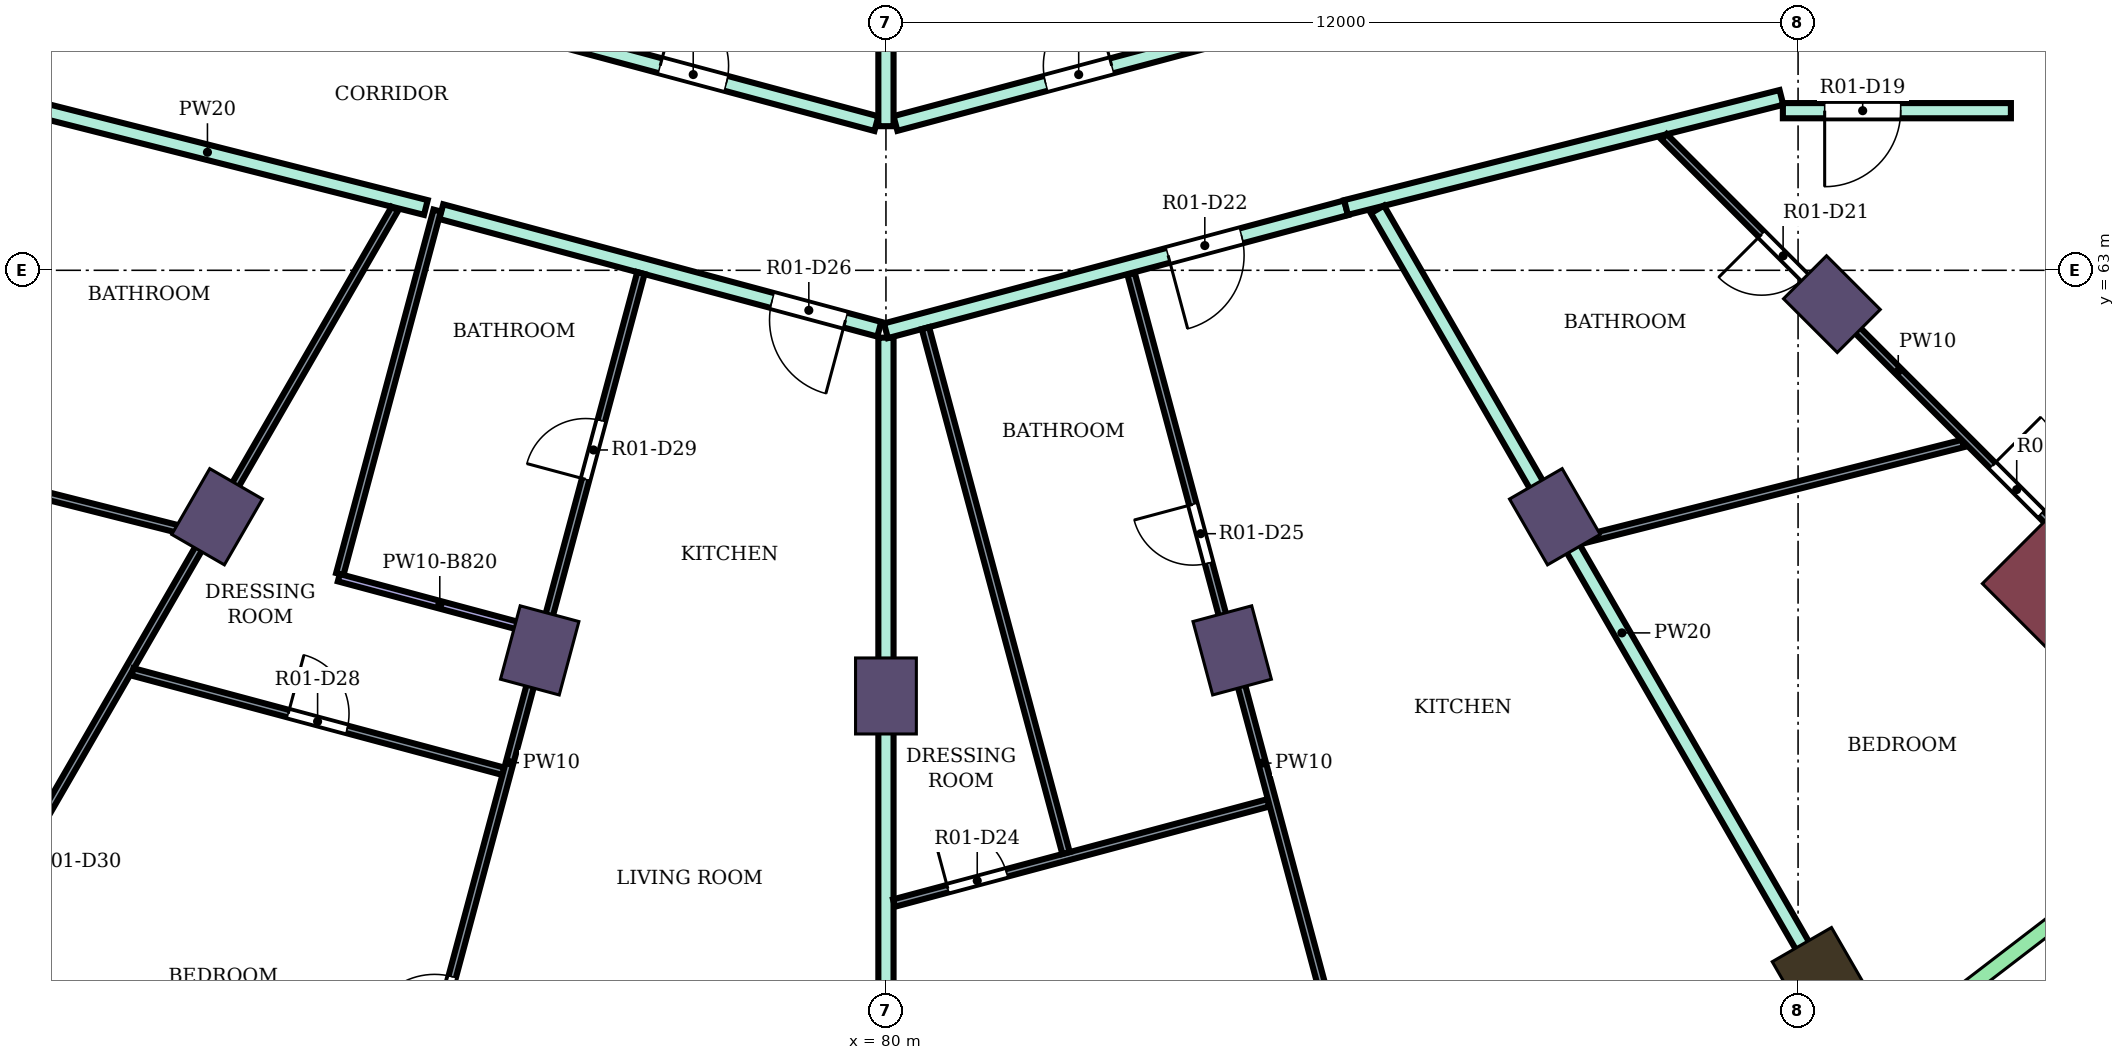
"""IFC4 building model, lengths in metres.
Left out: names, types, materials, properties, quantities, classifications, styles, units other than length and angle.
Written with IfcOpenShell. Run it as: python <this file> out.ifc"""

import sys

from ifc_helpers import new_model, si_unit, direction, frame, frame_2d, origin, origin_2d, place, context, subcontext, project, spatial, rectangle, extrude, element, fill, save


model = new_model("IFC4")
c1 = context("Model", 3, precision=1e-05, world=origin(), true_north=direction((0.0, 1.0)))
c2 = subcontext(c1, "Body", "Model", "MODEL_VIEW")
j1 = project(units=[si_unit("LENGTHUNIT", "METRE"), si_unit("PLANEANGLEUNIT", "RADIAN")], contexts=[c1])
p1 = place(None, origin())
s1 = spatial("IfcSite", under=j1, at=p1, CompositionType="ELEMENT")
p2 = place(p1, origin())
s2 = spatial("IfcBuilding", under=s1, at=p2, CompositionType="ELEMENT")
p3 = place(p2, frame((0.0, 0.0, 157.7)))
s3 = spatial("IfcBuildingStorey", under=s2, at=p3, CompositionType="ELEMENT", Elevation=157.7)
p4 = place(p3, frame((92.3, 53.696, 0.0), z_axis=(0.0, 0.0, 1.0), x_axis=(0.5, -0.866025403784, 0.0)))
e1 = element("IfcColumn", 1, at=p4, inside=s3, PredefinedType="COLUMN", context=c2, shape_type="SweptSolid", body=[
    extrude(rectangle(XDim=1.0, YDim=0.9, at=origin_2d()), origin(), (0.0, 0.0, 1.0), 4.1),
])
for number, where, z_axis, x_axis in (
    (2, (71.2, 59.758, 0.0), (0.0, 0.0, 1.0), (-0.5, -0.866, 0.0)),
    (3, (75.445, 58.0, 0.0), (0.0, 0.0, 1.0), (-0.259, -0.966, 0.0)),
    (4, (80.0, 57.4, 0.0), (0.0, 0.0, 1.0), (0.0, -1.0, 0.0)),
    (5, (84.555, 58.0, 0.0), (0.0, 0.0, 1.0), (0.259, -0.966, 0.0)),
    (6, (88.8, 59.758, 0.0), (0.0, 0.0, 1.0), (0.5, -0.866, 0.0)),
    (7, (92.445, 62.555, 0.0), (0.0, 0.0, 1.0), (0.707, -0.707, 0.0)),
):
    element("IfcColumn", number, at=place(p3, frame(where, z_axis=z_axis, x_axis=x_axis)), inside=s3, PredefinedType="COLUMN", context=c2, shape_type="SweptSolid", body=[
        extrude(rectangle(XDim=1.0, YDim=0.8, at=origin_2d()), origin(), (0.0, 0.0, 1.0), 4.1),
    ])
p5 = place(p3, frame((95.91, 59.09, 0.0), z_axis=(0.0, 0.0, 1.0), x_axis=(0.707106781187, -0.707106781187, 0.0)))
e8 = element("IfcColumn", 8, at=p5, inside=s3, PredefinedType="COLUMN", context=c2, shape_type="SweptSolid", body=[
    extrude(rectangle(XDim=1.8, YDim=2.4, at=origin_2d()), origin(), (0.0, 0.0, 1.0), 4.1),
])
p6 = place(p3, frame((68.2, 65.28, 0.0), z_axis=(0.0, 0.0, 1.0), x_axis=(0.969450596516, -0.245286650503, 0.0)))
e9 = element("IfcWall", 9, at=p6, inside=s3, PredefinedType="PARTITIONING", context=c2, shape_type="SweptSolid", body=[
    extrude(rectangle(XDim=5.928, YDim=0.2, at=frame_2d((2.964, 0.0))), origin(), (0.0, 0.0, 1.0), 3.65),
])
p7 = place(p3, frame((74.15, 63.772, 0.0), z_axis=(0.0, 0.0, 1.0), x_axis=(0.965807109237, -0.259261697417, 0.0)))
e10 = element("IfcWall", 10, at=p7, inside=s3, PredefinedType="PARTITIONING", context=c2, shape_type="SweptSolid", body=[
    extrude(rectangle(XDim=5.967, YDim=0.2, at=frame_2d((2.983, 0.0))), origin(), (0.0, 0.0, 1.0), 3.65),
])
p8 = place(p7, frame((4.507, 0.0, 0.0)))
e11 = element("IfcOpeningElement", 11, at=p8, cuts=e10, PredefinedType="OPENING", context=c2, shape_type="SweptSolid", body=[
    extrude(rectangle(XDim=1.0, YDim=2.1, at=frame_2d((0.5, 1.05))), frame((0.0, 0.11, 0.0), z_axis=(0.0, -1.0, 0.0), x_axis=(1.0, 0.0, 0.0)), (0.0, 0.0, 1.0), 0.22),
])
p9 = place(p3, frame((74.603, 66.342, 0.0), z_axis=(0.0, 0.0, 1.0), x_axis=(0.965920893652, -0.258837453254, 0.0)))
e12 = element("IfcWall", 12, at=p9, inside=s3, PredefinedType="PARTITIONING", context=c2, shape_type="SweptSolid", body=[
    extrude(rectangle(XDim=5.458, YDim=0.2, at=frame_2d((2.729, 0.0))), origin(), (0.0, 0.0, 1.0), 3.65),
])
p10 = place(p9, frame((2.512, 0.0, 0.0)))
e13 = element("IfcOpeningElement", 13, at=p10, cuts=e12, PredefinedType="OPENING", context=c2, shape_type="SweptSolid", body=[
    extrude(rectangle(XDim=0.9, YDim=2.1, at=frame_2d((0.45, 1.05))), frame((0.0, 0.11, 0.0), z_axis=(0.0, -1.0, 0.0), x_axis=(1.0, 0.0, 0.0)), (0.0, 0.0, 1.0), 0.22),
])
p11 = place(p3, frame((80.125, 64.932, 0.0), z_axis=(0.0, 0.0, 1.0), x_axis=(0.966236955806, 0.257655089674, 0.0)))
e14 = element("IfcWall", 14, at=p11, inside=s3, PredefinedType="PARTITIONING", context=c2, shape_type="SweptSolid", body=[
    extrude(rectangle(XDim=8.039, YDim=0.2, at=frame_2d((4.02, 0.0))), origin(), (0.0, 0.0, 1.0), 3.65),
])
p12 = place(p11, frame((6.298, 0.0, 0.0)))
e15 = element("IfcOpeningElement", 15, at=p12, cuts=e14, PredefinedType="OPENING", context=c2, shape_type="SweptSolid", body=[
    extrude(rectangle(XDim=0.9, YDim=2.1, at=frame_2d((0.45, 1.05))), frame((0.0, 0.11, 0.0), z_axis=(0.0, -1.0, 0.0), x_axis=(1.0, 0.0, 0.0)), (0.0, 0.0, 1.0), 0.22),
])
p13 = place(p11, frame((2.045, 0.0, 0.0)))
e16 = element("IfcOpeningElement", 16, at=p13, cuts=e14, PredefinedType="OPENING", context=c2, shape_type="SweptSolid", body=[
    extrude(rectangle(XDim=0.9, YDim=2.1, at=frame_2d((0.45, 1.05))), frame((0.0, 0.11, 0.0), z_axis=(0.0, -1.0, 0.0), x_axis=(1.0, 0.0, 0.0)), (0.0, 0.0, 1.0), 0.22),
])
p14 = place(p3, frame((80.0, 51.8, 0.0), z_axis=(0.0, 0.0, 1.0), x_axis=(0.0, 1.0, 0.0)))
e17 = element("IfcWall", 17, at=p14, inside=s3, PredefinedType="PARTITIONING", context=c2, shape_type="SweptSolid", body=[
    extrude(rectangle(XDim=10.314, YDim=0.2, at=frame_2d((5.157, 0.0))), origin(), (0.0, 0.0, 1.0), 3.65),
])
p15 = place(p3, frame((80.0, 62.205, 0.0), z_axis=(0.0, 0.0, 1.0), x_axis=(0.966104192593, 0.258152453124, 0.0)))
e18 = element("IfcWall", 18, at=p15, inside=s3, PredefinedType="PARTITIONING", context=c2, shape_type="SweptSolid", body=[
    extrude(rectangle(XDim=6.266, YDim=0.2, at=frame_2d((3.133, 0.0))), origin(), (0.0, 0.0, 1.0), 3.65),
])
p16 = place(p15, frame((3.842, 0.0, 0.0)))
e19 = element("IfcOpeningElement", 19, at=p16, cuts=e18, PredefinedType="OPENING", context=c2, shape_type="SweptSolid", body=[
    extrude(rectangle(XDim=1.0, YDim=2.1, at=frame_2d((0.5, 1.05))), frame((0.0, 0.11, 0.0), z_axis=(0.0, -1.0, 0.0), x_axis=(1.0, 0.0, 0.0)), (0.0, 0.0, 1.0), 0.22),
])
p17 = place(p3, frame((80.0, 64.896, 0.0), z_axis=(0.0, 0.0, 1.0), x_axis=(0.0, 1.0, 0.0)))
e20 = element("IfcWall", 20, at=p17, inside=s3, PredefinedType="PARTITIONING", context=c2, shape_type="SweptSolid", body=[
    extrude(rectangle(XDim=2.405, YDim=0.2, at=frame_2d((1.203, 0.0))), origin(), (0.0, 0.0, 1.0), 3.65),
])
p18 = place(p3, frame((86.053, 63.826, 0.0), z_axis=(0.0, 0.0, 1.0), x_axis=(0.969490004987, 0.245130843083, 0.0)))
e21 = element("IfcWall", 21, at=p18, inside=s3, PredefinedType="PARTITIONING", context=c2, shape_type="SweptSolid", body=[
    extrude(rectangle(XDim=5.908, YDim=0.2, at=frame_2d((2.954, 0.0))), origin(), (0.0, 0.0, 1.0), 3.65),
])
p19 = place(p3, frame((86.466, 63.801, 0.0), z_axis=(0.0, 0.0, 1.0), x_axis=(0.499951314491, -0.866053510551, 0.0)))
e22 = element("IfcWall", 22, at=p19, inside=s3, PredefinedType="PARTITIONING", context=c2, shape_type="SweptSolid", body=[
    extrude(rectangle(XDim=12.866, YDim=0.2, at=frame_2d((6.433, 0.0))), origin(), (0.0, 0.0, 1.0), 3.65),
])
p20 = place(p3, frame((91.8, 65.1, 0.0), z_axis=(0.0, 0.0, 1.0), x_axis=(1.0, 0.0, 0.0)))
e23 = element("IfcWall", 23, at=p20, inside=s3, PredefinedType="PARTITIONING", context=c2, shape_type="SweptSolid", body=[
    extrude(rectangle(XDim=3.0, YDim=0.2, at=frame_2d((1.5, 0.0))), origin(), (0.0, 0.0, 1.0), 3.65),
])
p21 = place(p20, frame((0.55, 0.0, 0.0)))
e24 = element("IfcOpeningElement", 24, at=p21, cuts=e23, PredefinedType="OPENING", context=c2, shape_type="SweptSolid", body=[
    extrude(rectangle(XDim=1.0, YDim=2.1, at=frame_2d((0.5, 1.05))), frame((0.0, 0.11, 0.0), z_axis=(0.0, -1.0, 0.0), x_axis=(1.0, 0.0, 0.0)), (0.0, 0.0, 1.0), 0.22),
])
p22 = place(p3, frame((65.904, 60.806, 0.0), z_axis=(0.0, 0.0, 1.0), x_axis=(0.969477107154, -0.245181848237, 0.0)))
e25 = element("IfcWall", 25, at=p22, inside=s3, PredefinedType="PARTITIONING", context=c2, shape_type="SweptSolid", body=[
    extrude(rectangle(XDim=5.252, YDim=0.1, at=frame_2d((2.626, 0.0))), origin(), (0.0, 0.0, 1.0), 3.65),
])
p23 = place(p22, frame((2.216, 0.0, 0.0)))
e26 = element("IfcOpeningElement", 26, at=p23, cuts=e25, PredefinedType="OPENING", context=c2, shape_type="SweptSolid", body=[
    extrude(rectangle(XDim=0.8, YDim=2.1, at=frame_2d((0.4, 1.05))), frame((0.0, 0.06, 0.0), z_axis=(0.0, -1.0, 0.0), x_axis=(1.0, 0.0, 0.0)), (0.0, 0.0, 1.0), 0.12),
])
p24 = place(p3, frame((67.101, 52.659, 0.0), z_axis=(0.0, 0.0, 1.0), x_axis=(0.499985055897, 0.866034031594, 0.0)))
e27 = element("IfcWall", 27, at=p24, inside=s3, PredefinedType="PARTITIONING", context=c2, shape_type="SweptSolid", body=[
    extrude(rectangle(XDim=12.876, YDim=0.1, at=frame_2d((6.438, 0.0))), origin(), (0.0, 0.0, 1.0), 3.65),
])
p25 = place(p24, frame((2.504, 0.0, 0.0)))
e28 = element("IfcOpeningElement", 28, at=p25, cuts=e27, PredefinedType="OPENING", context=c2, shape_type="SweptSolid", body=[
    extrude(rectangle(XDim=0.9, YDim=2.1, at=frame_2d((0.45, 1.05))), frame((0.0, 0.06, 0.0), z_axis=(0.0, -1.0, 0.0), x_axis=(1.0, 0.0, 0.0)), (0.0, 0.0, 1.0), 0.12),
])
p26 = place(p3, frame((70.088, 57.717, 0.0), z_axis=(0.0, 0.0, 1.0), x_axis=(0.965906836082, -0.258889907124, 0.0)))
e29 = element("IfcWall", 29, at=p26, inside=s3, PredefinedType="PARTITIONING", context=c2, shape_type="SweptSolid", body=[
    extrude(rectangle(XDim=5.051, YDim=0.1, at=frame_2d((2.525, 0.0))), origin(), (0.0, 0.0, 1.0), 3.65),
])
p27 = place(p26, frame((2.121, 0.0, 0.0)))
e30 = element("IfcOpeningElement", 30, at=p27, cuts=e29, PredefinedType="OPENING", context=c2, shape_type="SweptSolid", body=[
    extrude(rectangle(XDim=0.8, YDim=2.1, at=frame_2d((0.4, 1.05))), frame((0.0, 0.06, 0.0), z_axis=(0.0, -1.0, 0.0), x_axis=(1.0, 0.0, 0.0)), (0.0, 0.0, 1.0), 0.12),
])
p28 = place(p3, frame((72.815, 59.004, 0.0), z_axis=(0.0, 0.0, 1.0), x_axis=(0.25878292514, 0.96593550388, 0.0)))
e31 = element("IfcWall", 31, at=p28, inside=s3, PredefinedType="PARTITIONING", context=c2, shape_type="SweptSolid", body=[
    extrude(rectangle(XDim=4.95, YDim=0.1, at=frame_2d((2.475, 0.0))), origin(), (0.0, 0.0, 1.0), 3.65),
])
p29 = place(p3, frame((72.802, 58.956, 0.0), z_axis=(0.0, 0.0, 1.0), x_axis=(0.965887802097, -0.258960911647, 0.0)))
e32 = element("IfcWall", 32, at=p29, inside=s3, PredefinedType="PARTITIONING", context=c2, shape_type="SweptSolid", body=[
    extrude(rectangle(XDim=2.75, YDim=0.1, at=frame_2d((1.375, 0.0))), origin(), (0.0, 0.0, 1.0), 3.28),
])
p30 = place(p3, frame((73.322, 50.081, 0.0), z_axis=(0.0, 0.0, 1.0), x_axis=(0.258982801816, 0.965881932931, 0.0)))
e33 = element("IfcWall", 33, at=p30, inside=s3, PredefinedType="PARTITIONING", context=c2, shape_type="SweptSolid", body=[
    extrude(rectangle(XDim=13.338, YDim=0.1, at=frame_2d((6.669, 0.0))), origin(), (0.0, 0.0, 1.0), 3.65),
])
p31 = place(p30, frame((2.854, 0.0, 0.0)))
e34 = element("IfcOpeningElement", 34, at=p31, cuts=e33, PredefinedType="OPENING", context=c2, shape_type="SweptSolid", body=[
    extrude(rectangle(XDim=0.9, YDim=2.1, at=frame_2d((0.45, 1.05))), frame((0.0, 0.06, 0.0), z_axis=(0.0, -1.0, 0.0), x_axis=(1.0, 0.0, 0.0)), (0.0, 0.0, 1.0), 0.12),
])
p32 = place(p30, frame((10.528, 0.0, 0.0)))
e35 = element("IfcOpeningElement", 35, at=p32, cuts=e33, PredefinedType="OPENING", context=c2, shape_type="SweptSolid", body=[
    extrude(rectangle(XDim=0.8, YDim=2.1, at=frame_2d((0.4, 1.05))), frame((0.0, 0.06, 0.0), z_axis=(0.0, -1.0, 0.0), x_axis=(1.0, 0.0, 0.0)), (0.0, 0.0, 1.0), 0.12),
])
p33 = place(p3, frame((80.106, 54.676, 0.0), z_axis=(0.0, 0.0, 1.0), x_axis=(0.965976901679, 0.258628353863, 0.0)))
e36 = element("IfcWall", 36, at=p33, inside=s3, PredefinedType="PARTITIONING", context=c2, shape_type="SweptSolid", body=[
    extrude(rectangle(XDim=5.097, YDim=0.1, at=frame_2d((2.549, 0.0))), origin(), (0.0, 0.0, 1.0), 3.65),
])
p34 = place(p33, frame((0.733, 0.0, 0.0)))
e37 = element("IfcOpeningElement", 37, at=p34, cuts=e36, PredefinedType="OPENING", context=c2, shape_type="SweptSolid", body=[
    extrude(rectangle(XDim=0.8, YDim=2.1, at=frame_2d((0.4, 1.05))), frame((0.0, 0.06, 0.0), z_axis=(0.0, -1.0, 0.0), x_axis=(1.0, 0.0, 0.0)), (0.0, 0.0, 1.0), 0.12),
])
p35 = place(p3, frame((80.519, 62.239, 0.0), z_axis=(0.0, 0.0, 1.0), x_axis=(0.25878046533, -0.965936162882, 0.0)))
e38 = element("IfcWall", 38, at=p35, inside=s3, PredefinedType="PARTITIONING", context=c2, shape_type="SweptSolid", body=[
    extrude(rectangle(XDim=7.149, YDim=0.1, at=frame_2d((3.575, 0.0))), origin(), (0.0, 0.0, 1.0), 3.65),
])
p36 = place(p3, frame((83.225, 62.954, 0.0), z_axis=(0.0, 0.0, 1.0), x_axis=(0.258715941946, -0.965953446799, 0.0)))
e39 = element("IfcWall", 39, at=p36, inside=s3, PredefinedType="PARTITIONING", context=c2, shape_type="SweptSolid", body=[
    extrude(rectangle(XDim=13.328, YDim=0.1, at=frame_2d((6.664, 0.0))), origin(), (0.0, 0.0, 1.0), 3.65),
])
p37 = place(p36, frame((9.784, 0.0, 0.0)))
e40 = element("IfcOpeningElement", 40, at=p37, cuts=e39, PredefinedType="OPENING", context=c2, shape_type="SweptSolid", body=[
    extrude(rectangle(XDim=0.9, YDim=2.1, at=frame_2d((0.45, 1.05))), frame((0.0, 0.06, 0.0), z_axis=(0.0, -1.0, 0.0), x_axis=(1.0, 0.0, 0.0)), (0.0, 0.0, 1.0), 0.12),
])
p38 = place(p36, frame((3.14, 0.0, 0.0)))
e41 = element("IfcOpeningElement", 41, at=p38, cuts=e39, PredefinedType="OPENING", context=c2, shape_type="SweptSolid", body=[
    extrude(rectangle(XDim=0.8, YDim=2.1, at=frame_2d((0.4, 1.05))), frame((0.0, 0.06, 0.0), z_axis=(0.0, -1.0, 0.0), x_axis=(1.0, 0.0, 0.0)), (0.0, 0.0, 1.0), 0.12),
])
p39 = place(p3, frame((89.106, 59.441, 0.0), z_axis=(0.0, 0.0, 1.0), x_axis=(0.969462385749, 0.245240051009, 0.0)))
e42 = element("IfcWall", 42, at=p39, inside=s3, PredefinedType="PARTITIONING", context=c2, shape_type="SweptSolid", body=[
    extrude(rectangle(XDim=5.223, YDim=0.1, at=frame_2d((2.612, 0.0))), origin(), (0.0, 0.0, 1.0), 3.65),
])
p40 = place(p3, frame((90.236, 64.758, 0.0), z_axis=(0.0, 0.0, 1.0), x_axis=(0.706938769128, -0.707274753334, 0.0)))
e43 = element("IfcWall", 43, at=p40, inside=s3, PredefinedType="PARTITIONING", context=c2, shape_type="SweptSolid", body=[
    extrude(rectangle(XDim=8.72, YDim=0.1, at=frame_2d((4.36, 0.0))), origin(), (0.0, 0.0, 1.0), 3.65),
])
p41 = place(p40, frame((6.115, 0.0, 0.0)))
e44 = element("IfcOpeningElement", 44, at=p41, cuts=e43, PredefinedType="OPENING", context=c2, shape_type="SweptSolid", body=[
    extrude(rectangle(XDim=0.9, YDim=2.1, at=frame_2d((0.45, 1.05))), frame((0.0, 0.06, 0.0), z_axis=(0.0, -1.0, 0.0), x_axis=(1.0, 0.0, 0.0)), (0.0, 0.0, 1.0), 0.12),
])
p42 = place(p40, frame((1.817, 0.0, 0.0)))
e45 = element("IfcOpeningElement", 45, at=p42, cuts=e43, PredefinedType="OPENING", context=c2, shape_type="SweptSolid", body=[
    extrude(rectangle(XDim=0.8, YDim=2.1, at=frame_2d((0.4, 1.05))), frame((0.0, 0.06, 0.0), z_axis=(0.0, -1.0, 0.0), x_axis=(1.0, 0.0, 0.0)), (0.0, 0.0, 1.0), 0.12),
])
p43 = place(p21, frame((1.0, 0.0, 0.0), z_axis=(0.0, 0.0, 1.0), x_axis=(-1.0, 0.0, 0.0)))
e46 = element("IfcDoor", 46, at=p43, inside=s3, OperationType="SINGLE_SWING_RIGHT", PredefinedType="DOOR", context=c2, shape_type="SweptSolid", body=[
    extrude(rectangle(XDim=1.0, YDim=2.1, at=frame_2d((0.5, 1.05))), frame((0.0, 0.025, 0.0), z_axis=(0.0, -1.0, 0.0), x_axis=(1.0, 0.0, 0.0)), (0.0, 0.0, 1.0), 0.05),
])
fill(e24, e46)
p44 = place(p41, origin())
e47 = element("IfcDoor", 47, at=p44, inside=s3, OperationType="SINGLE_SWING_LEFT", PredefinedType="DOOR", context=c2, shape_type="SweptSolid", body=[
    extrude(rectangle(XDim=0.9, YDim=2.1, at=frame_2d((0.45, 1.05))), frame((0.0, 0.025, 0.0), z_axis=(0.0, -1.0, 0.0), x_axis=(1.0, 0.0, 0.0)), (0.0, 0.0, 1.0), 0.05),
])
fill(e44, e47)
p45 = place(p42, frame((0.8, 0.0, 0.0), z_axis=(0.0, 0.0, 1.0), x_axis=(-1.0, 0.0, 0.0)))
e48 = element("IfcDoor", 48, at=p45, inside=s3, OperationType="SINGLE_SWING_RIGHT", PredefinedType="DOOR", context=c2, shape_type="SweptSolid", body=[
    extrude(rectangle(XDim=0.8, YDim=2.1, at=frame_2d((0.4, 1.05))), frame((0.0, 0.025, 0.0), z_axis=(0.0, -1.0, 0.0), x_axis=(1.0, 0.0, 0.0)), (0.0, 0.0, 1.0), 0.05),
])
fill(e45, e48)
p46 = place(p16, frame((1.0, 0.0, 0.0), z_axis=(0.0, 0.0, 1.0), x_axis=(-1.0, 0.0, 0.0)))
e49 = element("IfcDoor", 49, at=p46, inside=s3, OperationType="SINGLE_SWING_RIGHT", PredefinedType="DOOR", context=c2, shape_type="SweptSolid", body=[
    extrude(rectangle(XDim=1.0, YDim=2.1, at=frame_2d((0.5, 1.05))), frame((0.0, 0.025, 0.0), z_axis=(0.0, -1.0, 0.0), x_axis=(1.0, 0.0, 0.0)), (0.0, 0.0, 1.0), 0.05),
])
fill(e19, e49)
p47 = place(p34, origin())
e50 = element("IfcDoor", 50, at=p47, inside=s3, OperationType="SINGLE_SWING_LEFT", PredefinedType="DOOR", context=c2, shape_type="SweptSolid", body=[
    extrude(rectangle(XDim=0.8, YDim=2.1, at=frame_2d((0.4, 1.05))), frame((0.0, 0.025, 0.0), z_axis=(0.0, -1.0, 0.0), x_axis=(1.0, 0.0, 0.0)), (0.0, 0.0, 1.0), 0.05),
])
fill(e37, e50)
p48 = place(p38, frame((0.8, 0.0, 0.0), z_axis=(0.0, 0.0, 1.0), x_axis=(-1.0, 0.0, 0.0)))
e51 = element("IfcDoor", 51, at=p48, inside=s3, OperationType="SINGLE_SWING_RIGHT", PredefinedType="DOOR", context=c2, shape_type="SweptSolid", body=[
    extrude(rectangle(XDim=0.8, YDim=2.1, at=frame_2d((0.4, 1.05))), frame((0.0, 0.025, 0.0), z_axis=(0.0, -1.0, 0.0), x_axis=(1.0, 0.0, 0.0)), (0.0, 0.0, 1.0), 0.05),
])
fill(e41, e51)
p49 = place(p8, frame((1.0, 0.0, 0.0), z_axis=(0.0, 0.0, 1.0), x_axis=(-1.0, 0.0, 0.0)))
e52 = element("IfcDoor", 52, at=p49, inside=s3, OperationType="SINGLE_SWING_LEFT", PredefinedType="DOOR", context=c2, shape_type="SweptSolid", body=[
    extrude(rectangle(XDim=1.0, YDim=2.1, at=frame_2d((0.5, 1.05))), frame((0.0, 0.025, 0.0), z_axis=(0.0, -1.0, 0.0), x_axis=(1.0, 0.0, 0.0)), (0.0, 0.0, 1.0), 0.05),
])
fill(e11, e52)
p50 = place(p31, origin())
e53 = element("IfcDoor", 53, at=p50, inside=s3, OperationType="SINGLE_SWING_LEFT", PredefinedType="DOOR", context=c2, shape_type="SweptSolid", body=[
    extrude(rectangle(XDim=0.9, YDim=2.1, at=frame_2d((0.45, 1.05))), frame((0.0, 0.025, 0.0), z_axis=(0.0, -1.0, 0.0), x_axis=(1.0, 0.0, 0.0)), (0.0, 0.0, 1.0), 0.05),
])
fill(e34, e53)
p51 = place(p27, origin())
e54 = element("IfcDoor", 54, at=p51, inside=s3, OperationType="SINGLE_SWING_LEFT", PredefinedType="DOOR", context=c2, shape_type="SweptSolid", body=[
    extrude(rectangle(XDim=0.8, YDim=2.1, at=frame_2d((0.4, 1.05))), frame((0.0, 0.025, 0.0), z_axis=(0.0, -1.0, 0.0), x_axis=(1.0, 0.0, 0.0)), (0.0, 0.0, 1.0), 0.05),
])
fill(e30, e54)
p52 = place(p32, origin())
e55 = element("IfcDoor", 55, at=p52, inside=s3, OperationType="SINGLE_SWING_LEFT", PredefinedType="DOOR", context=c2, shape_type="SweptSolid", body=[
    extrude(rectangle(XDim=0.8, YDim=2.1, at=frame_2d((0.4, 1.05))), frame((0.0, 0.025, 0.0), z_axis=(0.0, -1.0, 0.0), x_axis=(1.0, 0.0, 0.0)), (0.0, 0.0, 1.0), 0.05),
])
fill(e35, e55)
p53 = place(p13, origin())
e56 = element("IfcDoor", 56, at=p53, inside=s3, OperationType="SINGLE_SWING_RIGHT", PredefinedType="DOOR", context=c2, shape_type="SweptSolid", body=[
    extrude(rectangle(XDim=0.9, YDim=2.1, at=frame_2d((0.45, 1.05))), frame((0.0, 0.025, 0.0), z_axis=(0.0, -1.0, 0.0), x_axis=(1.0, 0.0, 0.0)), (0.0, 0.0, 1.0), 0.05),
])
fill(e16, e56)
p54 = place(p10, origin())
e57 = element("IfcDoor", 57, at=p54, inside=s3, OperationType="SINGLE_SWING_LEFT", PredefinedType="DOOR", context=c2, shape_type="SweptSolid", body=[
    extrude(rectangle(XDim=0.9, YDim=2.1, at=frame_2d((0.45, 1.05))), frame((0.0, 0.025, 0.0), z_axis=(0.0, -1.0, 0.0), x_axis=(1.0, 0.0, 0.0)), (0.0, 0.0, 1.0), 0.05),
])
fill(e13, e57)
save(model, sys.argv[1])
